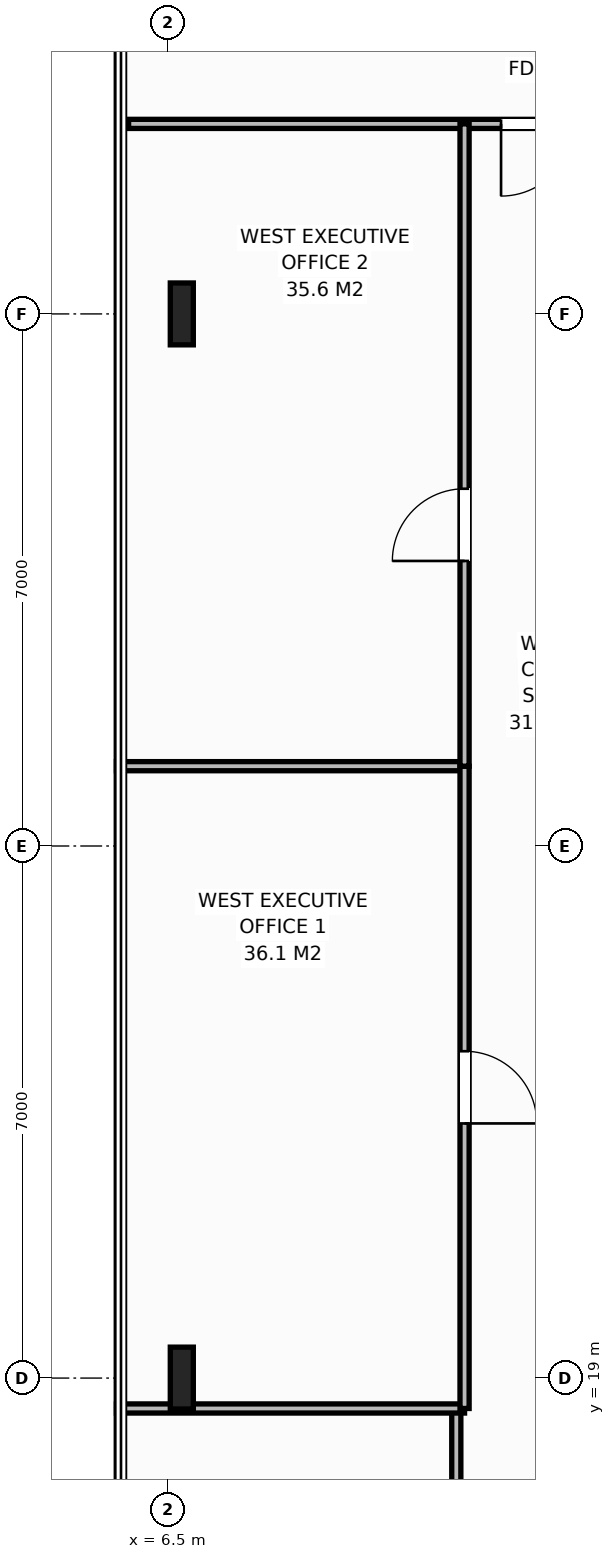
"""IFC4 building model, lengths in metres.
Left out: names, types, materials, properties, quantities, classifications, styles, units other than length and angle.
Written with IfcOpenShell. Run it as: python <this file> out.ifc"""

import sys

from ifc_helpers import new_model, si_unit, direction, frame, frame_2d, origin, origin_2d, place, context, subcontext, project, spatial, rectangle, i_section, extrude, element, fill, save


model = new_model("IFC4")
c1 = context("Model", 3, precision=1e-05, world=origin(), true_north=direction((0.0, 1.0)))
c2 = subcontext(c1, "Body", "Model", "MODEL_VIEW")
j1 = project(units=[si_unit("LENGTHUNIT", "METRE"), si_unit("PLANEANGLEUNIT", "RADIAN")], contexts=[c1])
p1 = place(None, origin())
s1 = spatial("IfcSite", under=j1, at=p1, CompositionType="ELEMENT")
p2 = place(p1, origin())
s2 = spatial("IfcBuilding", under=s1, at=p2, CompositionType="ELEMENT")
p3 = place(p2, frame((0.0, 0.0, 213.8)))
s3 = spatial("IfcBuildingStorey", under=s2, at=p3, CompositionType="ELEMENT", Elevation=213.8)
for number, where, z_axis, x_axis in (
    (1, (6.68, 19.0, 0.0), (0.0, 0.0, 1.0), (1.0, 0.0, 0.0)),
    (2, (6.68, 33.0, 0.0), (0.0, 0.0, 1.0), (1.0, 0.0, 0.0)),
):
    element("IfcColumn", number, at=place(p3, frame(where, z_axis=z_axis, x_axis=x_axis)), inside=s3, PredefinedType="COLUMN", context=c2, shape_type="SweptSolid", body=[
        extrude(i_section(OverallWidth=0.303, OverallDepth=0.814, WebThickness=0.021, FlangeThickness=0.04, at=origin_2d()), origin(), (0.0, 0.0, 1.0), 3.8),
    ])
p4 = place(p3, frame((10.291, 16.5, 0.0), z_axis=(0.0, 0.0, 1.0), x_axis=(0.0, 1.0, 0.0)))
e3 = element("IfcWall", 3, at=p4, inside=s3, PredefinedType="PARTITIONING", context=c2, shape_type="SweptSolid", body=[
    extrude(rectangle(XDim=2.1, YDim=0.12, at=frame_2d((1.05, 0.0))), origin(), (0.0, 0.0, 1.0), 3.58),
])
p5 = place(p3, frame((5.98, 35.5, 0.0), z_axis=(0.0, 0.0, 1.0), x_axis=(1.0, 0.0, 0.0)))
e4 = element("IfcWall", 4, at=p5, inside=s3, PredefinedType="PARTITIONING", context=c2, shape_type="SweptSolid", body=[
    extrude(rectangle(XDim=12.329, YDim=0.12, at=frame_2d((6.165, 0.0))), origin(), (0.0, 0.0, 1.0), 3.58),
])
p6 = place(p5, frame((4.9, 0.0, 0.0)))
e5 = element("IfcOpeningElement", 5, at=p6, cuts=e4, PredefinedType="OPENING", context=c2, shape_type="SweptSolid", body=[
    extrude(rectangle(XDim=0.95, YDim=2.15, at=frame_2d((0.475, 1.075))), frame((0.0, 0.07, 0.0), z_axis=(0.0, -1.0, 0.0), x_axis=(1.0, 0.0, 0.0)), (0.0, 0.0, 1.0), 0.14),
])
for number, where, z_axis, x_axis in (
    (6, (5.82, 18.6, 0.0), (0.0, 0.0, 1.0), (1.0, 0.0, 0.0)),
    (7, (5.82, 27.05, 0.0), (0.0, 0.0, 1.0), (1.0, 0.0, 0.0)),
):
    element("IfcWall", number, at=place(p3, frame(where, z_axis=z_axis, x_axis=x_axis)), inside=s3, PredefinedType="PARTITIONING", context=c2, shape_type="SweptSolid", body=[
        extrude(rectangle(XDim=4.58, YDim=0.12, at=frame_2d((2.29, 0.0))), origin(), (0.0, 0.0, 1.0), 3.58),
    ])
p7 = place(p3, frame((10.4, 18.6, 0.0), z_axis=(0.0, 0.0, 1.0), x_axis=(0.0, 1.0, 0.0)))
e8 = element("IfcWall", 8, at=p7, inside=s3, PredefinedType="PARTITIONING", context=c2, shape_type="SweptSolid", body=[
    extrude(rectangle(XDim=8.45, YDim=0.12, at=frame_2d((4.225, 0.0))), origin(), (0.0, 0.0, 1.0), 3.58),
])
p8 = place(p7, frame((3.75, 0.0, 0.0)))
e9 = element("IfcOpeningElement", 9, at=p8, cuts=e8, PredefinedType="OPENING", context=c2, shape_type="SweptSolid", body=[
    extrude(rectangle(XDim=0.95, YDim=2.15, at=frame_2d((0.475, 1.075))), frame((0.0, 0.07, 0.0), z_axis=(0.0, -1.0, 0.0), x_axis=(1.0, 0.0, 0.0)), (0.0, 0.0, 1.0), 0.14),
])
p9 = place(p3, frame((10.4, 27.05, 0.0), z_axis=(0.0, 0.0, 1.0), x_axis=(0.0, 1.0, 0.0)))
e10 = element("IfcWall", 10, at=p9, inside=s3, PredefinedType="PARTITIONING", context=c2, shape_type="SweptSolid", body=[
    extrude(rectangle(XDim=8.45, YDim=0.12, at=frame_2d((4.225, 0.0))), origin(), (0.0, 0.0, 1.0), 3.58),
])
p10 = place(p9, frame((2.7, 0.0, 0.0)))
e11 = element("IfcOpeningElement", 11, at=p10, cuts=e10, PredefinedType="OPENING", context=c2, shape_type="SweptSolid", body=[
    extrude(rectangle(XDim=0.95, YDim=2.15, at=frame_2d((0.475, 1.075))), frame((0.0, 0.07, 0.0), z_axis=(0.0, -1.0, 0.0), x_axis=(1.0, 0.0, 0.0)), (0.0, 0.0, 1.0), 0.14),
])
p11 = place(p6, origin())
e12 = element("IfcDoor", 12, at=p11, inside=s3, OperationType="SINGLE_SWING_RIGHT", PredefinedType="DOOR", context=c2, shape_type="SweptSolid", body=[
    extrude(rectangle(XDim=0.95, YDim=2.15, at=frame_2d((0.475, 1.075))), frame((0.0, 0.025, 0.0), z_axis=(0.0, -1.0, 0.0), x_axis=(1.0, 0.0, 0.0)), (0.0, 0.0, 1.0), 0.05),
])
fill(e5, e12)
p12 = place(p8, origin())
e13 = element("IfcDoor", 13, at=p12, inside=s3, OperationType="SINGLE_SWING_RIGHT", PredefinedType="DOOR", context=c2, shape_type="SweptSolid", body=[
    extrude(rectangle(XDim=0.95, YDim=2.15, at=frame_2d((0.475, 1.075))), frame((0.0, 0.025, 0.0), z_axis=(0.0, -1.0, 0.0), x_axis=(1.0, 0.0, 0.0)), (0.0, 0.0, 1.0), 0.05),
])
fill(e9, e13)
p13 = place(p10, origin())
e14 = element("IfcDoor", 14, at=p13, inside=s3, OperationType="SINGLE_SWING_LEFT", PredefinedType="DOOR", context=c2, shape_type="SweptSolid", body=[
    extrude(rectangle(XDim=0.95, YDim=2.15, at=frame_2d((0.475, 1.075))), frame((0.0, 0.025, 0.0), z_axis=(0.0, -1.0, 0.0), x_axis=(1.0, 0.0, 0.0)), (0.0, 0.0, 1.0), 0.05),
])
fill(e11, e14)
save(model, sys.argv[1])
